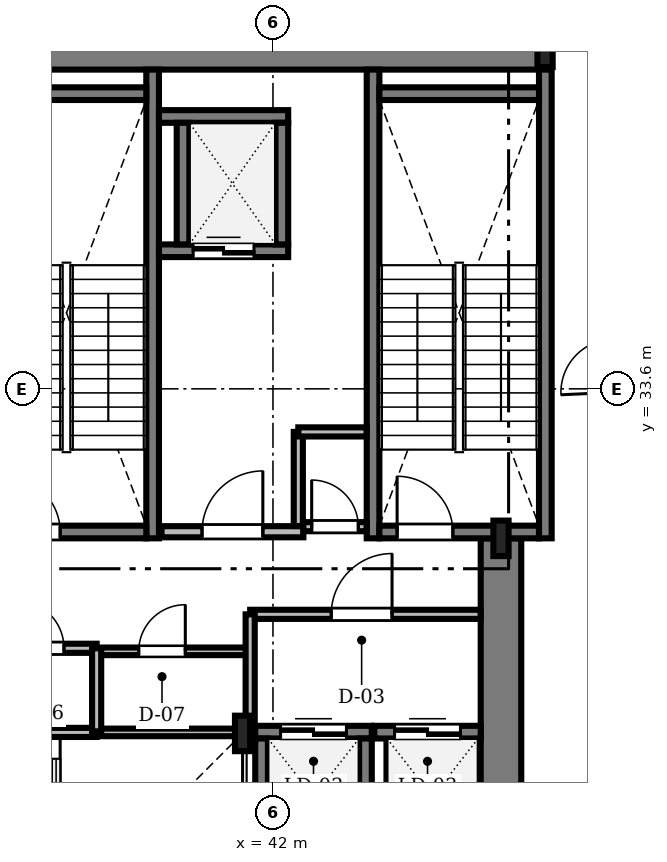
"""IFC4 building model, lengths in metres.
Left out: names, types, materials, properties, quantities, classifications, styles, units other than length and angle.
Written with IfcOpenShell. Run it as: python <this file> out.ifc"""

import sys

from ifc_helpers import new_model, si_unit, direction, frame, frame_2d, origin, origin_2d, place, context, subcontext, project, spatial, rectangle, i_section, extrude, source, transform, mapped, element, fill, save


model = new_model("IFC4")
c1 = context("Model", 3, precision=1e-05, world=origin(), true_north=direction((0.0, 1.0)))
c2 = subcontext(c1, "Body", "Model", "MODEL_VIEW")
j1 = project(units=[si_unit("LENGTHUNIT", "METRE"), si_unit("PLANEANGLEUNIT", "RADIAN")], contexts=[c1])
p1 = place(None, origin())
s1 = spatial("IfcSite", under=j1, at=p1, CompositionType="ELEMENT")
p2 = place(p1, origin())
s2 = spatial("IfcBuilding", under=s1, at=p2, CompositionType="ELEMENT")
p3 = place(p2, frame((0.0, 0.0, 172.2)))
s3 = spatial("IfcBuildingStorey", under=s2, at=p3, CompositionType="ELEMENT", Elevation=172.2)
m1 = source(origin(), c2, "Body", "SweptSolid", [
    extrude(rectangle(XDim=17.52, YDim=0.8, at=frame_2d((8.76, 0.0))), origin(), (0.0, 0.0, 1.0), 4.78),
])
p4 = place(p3, frame((29.85, 40.3, 0.0), z_axis=(0.0, 0.0, 1.0), x_axis=(1.0, 0.0, 0.0)))
e1 = element("IfcWall", 1, at=p4, inside=s3, PredefinedType="SHEAR", context=c2, shape_type="MappedRepresentation", body=[
    mapped(m1, transform((0.0, 0.0, 0.0), scale=1.0)),
])
m2 = source(origin(), c2, "Body", "SweptSolid", [
    extrude(rectangle(XDim=13.15, YDim=0.8, at=frame_2d((6.575, 0.0))), origin(), (0.0, 0.0, 1.0), 4.78),
])
p5 = place(p3, frame((46.5, 17.5, 0.0), z_axis=(0.0, 0.0, 1.0), x_axis=(0.0, 1.0, 0.0)))
e2 = element("IfcWall", 2, at=p5, inside=s3, PredefinedType="SHEAR", context=c2, shape_type="MappedRepresentation", body=[
    mapped(m2, transform((0.0, 0.0, 0.0), scale=1.0)),
])
m3 = source(origin(), c2, "Body", "SweptSolid", [
    extrude(i_section(OverallWidth=0.3, OverallDepth=0.7, WebThickness=0.017, FlangeThickness=0.032, FilletRadius=0.027, at=origin_2d()), origin(), (0.0, 0.0, 1.0), 4.78),
])
for number, where, z_axis, x_axis in (
    (3, (41.4, 26.8, 0.0), (0.0, 0.0, 1.0), (1.0, 0.0, 0.0)),
    (4, (46.5, 30.65, 0.0), (0.0, 0.0, 1.0), (1.0, 0.0, 0.0)),
    (5, (47.37, 40.3, 0.0), (0.0, 0.0, 1.0), (1.0, 0.0, 0.0)),
):
    element("IfcColumn", number, at=place(p3, frame(where, z_axis=z_axis, x_axis=x_axis)), inside=s3, PredefinedType="COLUMN", context=c2, shape_type="MappedRepresentation", body=[
        mapped(m3, transform((0.0, 0.0, 0.0), scale=1.0)),
    ])
m4 = source(origin(), c2, "Body", "SweptSolid", [
    extrude(rectangle(XDim=9.25, YDim=0.25, at=frame_2d((4.625, 0.0))), origin(), (0.0, 0.0, 1.0), 4.8),
])
p6 = place(p3, frame((39.625, 30.65, 0.0), z_axis=(0.0, 0.0, 1.0), x_axis=(0.0, 1.0, 0.0)))
e6 = element("IfcWall", 6, at=p6, inside=s3, PredefinedType="SOLIDWALL", context=c2, shape_type="MappedRepresentation", body=[
    mapped(m4, transform((0.0, 0.0, 0.0), scale=1.0)),
])
m5 = source(origin(), c2, "Body", "SweptSolid", [
    extrude(rectangle(XDim=3.15, YDim=0.25, at=frame_2d((1.575, 0.0))), origin(), (0.0, 0.0, 1.0), 4.8),
])
p7 = place(p3, frame((36.35, 39.425, 0.0), z_axis=(0.0, 0.0, 1.0), x_axis=(1.0, 0.0, 0.0)))
e7 = element("IfcWall", 7, at=p7, inside=s3, PredefinedType="SOLIDWALL", context=c2, shape_type="MappedRepresentation", body=[
    mapped(m5, transform((0.0, 0.0, 0.0), scale=1.0)),
])
p8 = place(p3, frame((36.35, 30.775, 0.0), z_axis=(0.0, 0.0, 1.0), x_axis=(1.0, 0.0, 0.0)))
e8 = element("IfcWall", 8, at=p8, inside=s3, PredefinedType="SOLIDWALL", context=c2, shape_type="MappedRepresentation", body=[
    mapped(m5, transform((0.0, 0.0, 0.0), scale=1.0)),
])
m6 = source(origin(), c2, "Body", "SweptSolid", [
    extrude(rectangle(XDim=1.1, YDim=2.2, at=frame_2d((0.55, 1.1))), frame((0.0, 0.135, 0.0), z_axis=(0.0, -1.0, 0.0), x_axis=(1.0, 0.0, 0.0)), (0.0, 0.0, 1.0), 0.27),
])
p9 = place(p8, frame((0.35, 0.0, 0.0)))
e9 = element("IfcOpeningElement", 9, at=p9, cuts=e8, PredefinedType="OPENING", context=c2, shape_type="MappedRepresentation", body=[
    mapped(m6, transform((0.0, 0.0, 0.0), scale=1.0)),
])
for number, where, z_axis, x_axis in (
    (10, (43.975, 30.65, 0.0), (0.0, 0.0, 1.0), (0.0, 1.0, 0.0)),
    (11, (47.375, 30.65, 0.0), (0.0, 0.0, 1.0), (0.0, 1.0, 0.0)),
):
    element("IfcWall", number, at=place(p3, frame(where, z_axis=z_axis, x_axis=x_axis)), inside=s3, PredefinedType="SOLIDWALL", context=c2, shape_type="MappedRepresentation", body=[
        mapped(m4, transform((0.0, 0.0, 0.0), scale=1.0)),
    ])
p10 = place(p3, frame((44.1, 39.425, 0.0), z_axis=(0.0, 0.0, 1.0), x_axis=(1.0, 0.0, 0.0)))
e12 = element("IfcWall", 12, at=p10, inside=s3, PredefinedType="SOLIDWALL", context=c2, shape_type="MappedRepresentation", body=[
    mapped(m5, transform((0.0, 0.0, 0.0), scale=1.0)),
])
p11 = place(p3, frame((44.1, 30.775, 0.0), z_axis=(0.0, 0.0, 1.0), x_axis=(1.0, 0.0, 0.0)))
e13 = element("IfcWall", 13, at=p11, inside=s3, PredefinedType="SOLIDWALL", context=c2, shape_type="MappedRepresentation", body=[
    mapped(m5, transform((0.0, 0.0, 0.0), scale=1.0)),
])
p12 = place(p11, frame((0.35, 0.0, 0.0)))
e14 = element("IfcOpeningElement", 14, at=p12, cuts=e13, PredefinedType="OPENING", context=c2, shape_type="MappedRepresentation", body=[
    mapped(m6, transform((0.0, 0.0, 0.0), scale=1.0)),
])
m7 = source(origin(), c2, "Body", "SweptSolid", [
    extrude(rectangle(XDim=2.8, YDim=0.22, at=frame_2d((1.4, 0.0))), origin(), (0.0, 0.0, 1.0), 4.78),
])
p13 = place(p3, frame((39.8, 30.78, 0.0), z_axis=(0.0, 0.0, 1.0), x_axis=(1.0, 0.0, 0.0)))
e15 = element("IfcWall", 15, at=p13, inside=s3, PredefinedType="SOLIDWALL", context=c2, shape_type="MappedRepresentation", body=[
    mapped(m7, transform((0.0, 0.0, 0.0), scale=1.0)),
])
m8 = source(origin(), c2, "Body", "SweptSolid", [
    extrude(rectangle(XDim=1.2, YDim=2.2, at=frame_2d((0.6, 1.1))), frame((0.0, 0.12, 0.0), z_axis=(0.0, -1.0, 0.0), x_axis=(1.0, 0.0, 0.0)), (0.0, 0.0, 1.0), 0.24),
])
p14 = place(p13, frame((0.8, 0.0, 0.0)))
e16 = element("IfcOpeningElement", 16, at=p14, cuts=e15, PredefinedType="OPENING", context=c2, shape_type="MappedRepresentation", body=[
    mapped(m8, transform((0.0, 0.0, 0.0), scale=1.0)),
])
m9 = source(origin(), c2, "Body", "SweptSolid", [
    extrude(rectangle(XDim=2.55, YDim=0.25, at=frame_2d((1.275, 0.0))), origin(), (0.0, 0.0, 1.0), 4.78),
])
p15 = place(p3, frame((39.75, 36.325, 0.0), z_axis=(0.0, 0.0, 1.0), x_axis=(1.0, 0.0, 0.0)))
e17 = element("IfcWall", 17, at=p15, inside=s3, PredefinedType="SOLIDWALL", context=c2, shape_type="MappedRepresentation", body=[
    mapped(m9, transform((0.0, 0.0, 0.0), scale=1.0)),
])
m10 = source(origin(), c2, "Body", "SweptSolid", [
    extrude(rectangle(XDim=1.2, YDim=2.25, at=frame_2d((0.6, 1.125))), frame((0.0, 0.135, 0.0), z_axis=(0.0, -1.0, 0.0), x_axis=(1.0, 0.0, 0.0)), (0.0, 0.0, 1.0), 0.27),
])
p16 = place(p15, frame((0.675, 0.0, 0.0)))
e18 = element("IfcOpeningElement", 18, at=p16, cuts=e17, PredefinedType="OPENING", context=c2, shape_type="MappedRepresentation", body=[
    mapped(m10, transform((0.0, 0.0, 0.0), scale=1.0)),
])
p17 = place(p3, frame((39.75, 38.975, 0.0), z_axis=(0.0, 0.0, 1.0), x_axis=(1.0, 0.0, 0.0)))
e19 = element("IfcWall", 19, at=p17, inside=s3, PredefinedType="SOLIDWALL", context=c2, shape_type="MappedRepresentation", body=[
    mapped(m9, transform((0.0, 0.0, 0.0), scale=1.0)),
])
m11 = source(origin(), c2, "Body", "SweptSolid", [
    extrude(rectangle(XDim=2.4, YDim=0.25, at=frame_2d((1.2, 0.0))), origin(), (0.0, 0.0, 1.0), 4.78),
])
for number, where, z_axis, x_axis in (
    (20, (40.225, 36.45, 0.0), (0.0, 0.0, 1.0), (0.0, 1.0, 0.0)),
    (21, (42.175, 36.45, 0.0), (0.0, 0.0, 1.0), (0.0, 1.0, 0.0)),
):
    element("IfcWall", number, at=place(p3, frame(where, z_axis=z_axis, x_axis=x_axis)), inside=s3, PredefinedType="SOLIDWALL", context=c2, shape_type="MappedRepresentation", body=[
        mapped(m11, transform((0.0, 0.0, 0.0), scale=1.0)),
    ])
m12 = source(origin(), c2, "Body", "SweptSolid", [
    extrude(rectangle(XDim=2.3, YDim=0.25, at=frame_2d((1.15, 0.0))), origin(), (0.0, 0.0, 1.0), 4.78),
])
p18 = place(p3, frame((41.65, 26.825, 0.0), z_axis=(0.0, 0.0, 1.0), x_axis=(1.0, 0.0, 0.0)))
e22 = element("IfcWall", 22, at=p18, inside=s3, PredefinedType="SOLIDWALL", context=c2, shape_type="MappedRepresentation", body=[
    mapped(m12, transform((0.0, 0.0, 0.0), scale=1.0)),
])
m13 = source(origin(), c2, "Body", "SweptSolid", [
    extrude(rectangle(XDim=1.3, YDim=2.3, at=frame_2d((0.65, 1.15))), frame((0.0, 0.135, 0.0), z_axis=(0.0, -1.0, 0.0), x_axis=(1.0, 0.0, 0.0)), (0.0, 0.0, 1.0), 0.27),
])
p19 = place(p18, frame((0.5, 0.0, 0.0)))
e23 = element("IfcOpeningElement", 23, at=p19, cuts=e22, PredefinedType="OPENING", context=c2, shape_type="MappedRepresentation", body=[
    mapped(m13, transform((0.0, 0.0, 0.0), scale=1.0)),
])
for number, where, z_axis, x_axis in (
    (24, (41.775, 24.4, 0.0), (0.0, 0.0, 1.0), (0.0, 1.0, 0.0)),
    (25, (43.825, 24.4, 0.0), (0.0, 0.0, 1.0), (0.0, 1.0, 0.0)),
):
    element("IfcWall", number, at=place(p3, frame(where, z_axis=z_axis, x_axis=x_axis)), inside=s3, PredefinedType="SOLIDWALL", context=c2, shape_type="MappedRepresentation", body=[
        mapped(m12, transform((0.0, 0.0, 0.0), scale=1.0)),
    ])
m14 = source(origin(), c2, "Body", "SweptSolid", [
    extrude(rectangle(XDim=2.1, YDim=0.25, at=frame_2d((1.05, 0.0))), origin(), (0.0, 0.0, 1.0), 4.78),
])
p20 = place(p3, frame((44.0, 26.825, 0.0), z_axis=(0.0, 0.0, 1.0), x_axis=(1.0, 0.0, 0.0)))
e26 = element("IfcWall", 26, at=p20, inside=s3, PredefinedType="SOLIDWALL", context=c2, shape_type="MappedRepresentation", body=[
    mapped(m14, transform((0.0, 0.0, 0.0), scale=1.0)),
])
p21 = place(p20, frame((0.4, 0.0, 0.0)))
e27 = element("IfcOpeningElement", 27, at=p21, cuts=e26, PredefinedType="OPENING", context=c2, shape_type="MappedRepresentation", body=[
    mapped(m13, transform((0.0, 0.0, 0.0), scale=1.0)),
])
m15 = source(origin(), c2, "Body", "SweptSolid", [
    extrude(rectangle(XDim=4.548, YDim=0.18, at=frame_2d((2.274, 0.0))), origin(), (0.0, 0.0, 1.0), 4.412),
])
p22 = place(p3, frame((41.55, 29.15, 0.0), z_axis=(0.0, 0.0, 1.0), x_axis=(1.0, 0.0, 0.0)))
e28 = element("IfcWall", 28, at=p22, inside=s3, PredefinedType="PARTITIONING", context=c2, shape_type="MappedRepresentation", body=[
    mapped(m15, transform((0.0, 0.0, 0.0), scale=1.0)),
])
m16 = source(origin(), c2, "Body", "SweptSolid", [
    extrude(rectangle(XDim=1.2, YDim=2.2, at=frame_2d((0.6, 1.1))), frame((0.0, 0.1, 0.0), z_axis=(0.0, -1.0, 0.0), x_axis=(1.0, 0.0, 0.0)), (0.0, 0.0, 1.0), 0.2),
])
p23 = place(p22, frame((1.6, 0.0, 0.0)))
e29 = element("IfcOpeningElement", 29, at=p23, cuts=e28, PredefinedType="OPENING", context=c2, shape_type="MappedRepresentation", body=[
    mapped(m16, transform((0.0, 0.0, 0.0), scale=1.0)),
])
m17 = source(origin(), c2, "Body", "SweptSolid", [
    extrude(rectangle(XDim=3.37, YDim=0.18, at=frame_2d((1.685, 0.0))), origin(), (0.0, 0.0, 1.0), 4.78),
])
p24 = place(p3, frame((35.15, 28.48, 0.0), z_axis=(0.0, 0.0, 1.0), x_axis=(1.0, 0.0, 0.0)))
e30 = element("IfcWall", 30, at=p24, inside=s3, PredefinedType="PARTITIONING", context=c2, shape_type="MappedRepresentation", body=[
    mapped(m17, transform((0.0, 0.0, 0.0), scale=1.0)),
])
m18 = source(origin(), c2, "Body", "SweptSolid", [
    extrude(rectangle(XDim=0.95, YDim=2.15, at=frame_2d((0.475, 1.075))), frame((0.0, 0.1, 0.0), z_axis=(0.0, -1.0, 0.0), x_axis=(1.0, 0.0, 0.0)), (0.0, 0.0, 1.0), 0.2),
])
p25 = place(p24, frame((1.775, 0.0, 0.0)))
e31 = element("IfcOpeningElement", 31, at=p25, cuts=e30, PredefinedType="OPENING", context=c2, shape_type="MappedRepresentation", body=[
    mapped(m18, transform((0.0, 0.0, 0.0), scale=1.0)),
])
m19 = source(origin(), c2, "Body", "SweptSolid", [
    extrude(rectangle(XDim=3.0, YDim=0.15, at=frame_2d((1.5, 0.0))), origin(), (0.0, 0.0, 1.0), 4.78),
])
p26 = place(p3, frame((38.52, 28.42, 0.0), z_axis=(0.0, 0.0, 1.0), x_axis=(1.0, 0.0, 0.0)))
e32 = element("IfcWall", 32, at=p26, inside=s3, PredefinedType="PARTITIONING", context=c2, shape_type="MappedRepresentation", body=[
    mapped(m19, transform((0.0, 0.0, 0.0), scale=1.0)),
])
m20 = source(origin(), c2, "Body", "SweptSolid", [
    extrude(rectangle(XDim=0.92, YDim=2.1, at=frame_2d((0.46, 1.05))), frame((0.0, 0.085, 0.0), z_axis=(0.0, -1.0, 0.0), x_axis=(1.0, 0.0, 0.0)), (0.0, 0.0, 1.0), 0.17),
])
p27 = place(p26, frame((0.83, 0.0, 0.0)))
e33 = element("IfcOpeningElement", 33, at=p27, cuts=e32, PredefinedType="OPENING", context=c2, shape_type="MappedRepresentation", body=[
    mapped(m20, transform((0.0, 0.0, 0.0), scale=1.0)),
])
m21 = source(origin(), c2, "Body", "SweptSolid", [
    extrude(rectangle(XDim=1.248, YDim=0.18, at=frame_2d((0.624, 0.0))), origin(), (0.0, 0.0, 1.0), 4.78),
])
p28 = place(p3, frame((42.6, 30.88, 0.0), z_axis=(0.0, 0.0, 1.0), x_axis=(1.0, 0.0, 0.0)))
e34 = element("IfcWall", 34, at=p28, inside=s3, PredefinedType="PARTITIONING", context=c2, shape_type="MappedRepresentation", body=[
    mapped(m21, transform((0.0, 0.0, 0.0), scale=1.0)),
])
m22 = source(origin(), c2, "Body", "SweptSolid", [
    extrude(rectangle(XDim=0.92, YDim=2.1, at=frame_2d((0.46, 1.05))), frame((0.0, 0.1, 0.0), z_axis=(0.0, -1.0, 0.0), x_axis=(1.0, 0.0, 0.0)), (0.0, 0.0, 1.0), 0.2),
])
p29 = place(p28, frame((0.164, 0.0, 0.0)))
e35 = element("IfcOpeningElement", 35, at=p29, cuts=e34, PredefinedType="OPENING", context=c2, shape_type="MappedRepresentation", body=[
    mapped(m22, transform((0.0, 0.0, 0.0), scale=1.0)),
])
m23 = source(origin(), c2, "Body", "SweptSolid", [
    extrude(rectangle(XDim=3.37, YDim=0.18, at=frame_2d((1.685, 0.0))), origin(), (0.0, 0.0, 1.0), 4.322),
])
p30 = place(p3, frame((35.15, 26.82, 0.0), z_axis=(0.0, 0.0, 1.0), x_axis=(1.0, 0.0, 0.0)))
e36 = element("IfcWall", 36, at=p30, inside=s3, PredefinedType="PARTITIONING", context=c2, shape_type="MappedRepresentation", body=[
    mapped(m23, transform((0.0, 0.0, 0.0), scale=1.0)),
])
m24 = source(origin(), c2, "Body", "SweptSolid", [
    extrude(rectangle(XDim=3.0, YDim=0.15, at=frame_2d((1.5, 0.0))), origin(), (0.0, 0.0, 1.0), 4.222),
])
p31 = place(p3, frame((38.52, 26.82, 0.0), z_axis=(0.0, 0.0, 1.0), x_axis=(1.0, 0.0, 0.0)))
e37 = element("IfcWall", 37, at=p31, inside=s3, PredefinedType="PARTITIONING", context=c2, shape_type="MappedRepresentation", body=[
    mapped(m24, transform((0.0, 0.0, 0.0), scale=1.0)),
])
m25 = source(origin(), c2, "Body", "SweptSolid", [
    extrude(rectangle(XDim=2.35, YDim=0.18, at=frame_2d((1.175, 0.0))), origin(), (0.0, 0.0, 1.0), 4.222),
])
p32 = place(p3, frame((41.55, 26.8, 0.0), z_axis=(0.0, 0.0, 1.0), x_axis=(0.0, 1.0, 0.0)))
e38 = element("IfcWall", 38, at=p32, inside=s3, PredefinedType="PARTITIONING", context=c2, shape_type="MappedRepresentation", body=[
    mapped(m25, transform((0.0, 0.0, 0.0), scale=1.0)),
])
m26 = source(origin(), c2, "Body", "SweptSolid", [
    extrude(rectangle(XDim=1.858, YDim=0.18, at=frame_2d((0.929, 0.0))), origin(), (0.0, 0.0, 1.0), 4.78),
])
p33 = place(p3, frame((42.5, 30.892, 0.0), z_axis=(0.0, 0.0, 1.0), x_axis=(0.0, 1.0, 0.0)))
e39 = element("IfcWall", 39, at=p33, inside=s3, PredefinedType="PARTITIONING", context=c2, shape_type="MappedRepresentation", body=[
    mapped(m26, transform((0.0, 0.0, 0.0), scale=1.0)),
])
m27 = source(origin(), c2, "Body", "SweptSolid", [
    extrude(rectangle(XDim=1.66, YDim=0.18, at=frame_2d((0.83, 0.0))), origin(), (0.0, 0.0, 1.0), 4.322),
])
p34 = place(p3, frame((38.52, 26.82, 0.0), z_axis=(0.0, 0.0, 1.0), x_axis=(0.0, 1.0, 0.0)))
e40 = element("IfcWall", 40, at=p34, inside=s3, PredefinedType="PARTITIONING", context=c2, shape_type="MappedRepresentation", body=[
    mapped(m27, transform((0.0, 0.0, 0.0), scale=1.0)),
])
m28 = source(origin(), c2, "Body", "SweptSolid", [
    extrude(rectangle(XDim=1.348, YDim=0.18, at=frame_2d((0.674, 0.0))), origin(), (0.0, 0.0, 1.0), 4.78),
])
p35 = place(p3, frame((42.5, 32.75, 0.0), z_axis=(0.0, 0.0, 1.0), x_axis=(1.0, 0.0, 0.0)))
e41 = element("IfcWall", 41, at=p35, inside=s3, PredefinedType="PARTITIONING", context=c2, shape_type="MappedRepresentation", body=[
    mapped(m28, transform((0.0, 0.0, 0.0), scale=1.0)),
])
m29 = source(origin(), c2, "Body", "SweptSolid", [
    extrude(rectangle(XDim=1.1, YDim=2.2, at=frame_2d((0.55, 1.1))), frame((0.0, 0.025, 0.0), z_axis=(0.0, -1.0, 0.0), x_axis=(1.0, 0.0, 0.0)), (0.0, 0.0, 1.0), 0.05),
])
p36 = place(p9, origin())
e42 = element("IfcDoor", 42, at=p36, inside=s3, OperationType="SINGLE_SWING_LEFT", PredefinedType="DOOR", context=c2, shape_type="MappedRepresentation", body=[
    mapped(m29, transform((0.0, 0.0, 0.0), scale=1.0)),
])
fill(e9, e42)
p37 = place(p12, origin())
e43 = element("IfcDoor", 43, at=p37, inside=s3, OperationType="SINGLE_SWING_LEFT", PredefinedType="DOOR", context=c2, shape_type="MappedRepresentation", body=[
    mapped(m29, transform((0.0, 0.0, 0.0), scale=1.0)),
])
fill(e14, e43)
m30 = source(origin(), c2, "Body", "SweptSolid", [
    extrude(rectangle(XDim=1.2, YDim=2.2, at=frame_2d((0.6, 1.1))), frame((0.0, 0.025, 0.0), z_axis=(0.0, -1.0, 0.0), x_axis=(1.0, 0.0, 0.0)), (0.0, 0.0, 1.0), 0.05),
])
p38 = place(p14, origin())
e44 = element("IfcDoor", 44, at=p38, inside=s3, OperationType="SINGLE_SWING_RIGHT", PredefinedType="DOOR", context=c2, shape_type="MappedRepresentation", body=[
    mapped(m30, transform((0.0, 0.0, 0.0), scale=1.0)),
])
fill(e16, e44)
m31 = source(origin(), c2, "Body", "SweptSolid", [
    extrude(rectangle(XDim=1.2, YDim=2.25, at=frame_2d((0.6, 1.125))), frame((0.0, 0.025, 0.0), z_axis=(0.0, -1.0, 0.0), x_axis=(1.0, 0.0, 0.0)), (0.0, 0.0, 1.0), 0.05),
])
p39 = place(p16, origin())
e45 = element("IfcDoor", 45, at=p39, inside=s3, OperationType="DOUBLE_DOOR_SLIDING", PredefinedType="DOOR", context=c2, shape_type="MappedRepresentation", body=[
    mapped(m31, transform((0.0, 0.0, 0.0), scale=1.0)),
])
fill(e18, e45)
m32 = source(origin(), c2, "Body", "SweptSolid", [
    extrude(rectangle(XDim=1.3, YDim=2.3, at=frame_2d((0.65, 1.15))), frame((0.0, 0.025, 0.0), z_axis=(0.0, -1.0, 0.0), x_axis=(1.0, 0.0, 0.0)), (0.0, 0.0, 1.0), 0.05),
])
p40 = place(p19, origin())
e46 = element("IfcDoor", 46, at=p40, inside=s3, OperationType="DOUBLE_DOOR_SLIDING", PredefinedType="DOOR", context=c2, shape_type="MappedRepresentation", body=[
    mapped(m32, transform((0.0, 0.0, 0.0), scale=1.0)),
])
fill(e23, e46)
p41 = place(p21, origin())
e47 = element("IfcDoor", 47, at=p41, inside=s3, OperationType="DOUBLE_DOOR_SLIDING", PredefinedType="DOOR", context=c2, shape_type="MappedRepresentation", body=[
    mapped(m32, transform((0.0, 0.0, 0.0), scale=1.0)),
])
fill(e27, e47)
p42 = place(p23, origin())
e48 = element("IfcDoor", 48, at=p42, inside=s3, OperationType="SINGLE_SWING_RIGHT", PredefinedType="DOOR", context=c2, shape_type="MappedRepresentation", body=[
    mapped(m30, transform((0.0, 0.0, 0.0), scale=1.0)),
])
fill(e29, e48)
m33 = source(origin(), c2, "Body", "SweptSolid", [
    extrude(rectangle(XDim=0.95, YDim=2.15, at=frame_2d((0.475, 1.075))), frame((0.0, 0.025, 0.0), z_axis=(0.0, -1.0, 0.0), x_axis=(1.0, 0.0, 0.0)), (0.0, 0.0, 1.0), 0.05),
])
p43 = place(p25, origin())
e49 = element("IfcDoor", 49, at=p43, inside=s3, OperationType="SINGLE_SWING_LEFT", PredefinedType="DOOR", context=c2, shape_type="MappedRepresentation", body=[
    mapped(m33, transform((0.0, 0.0, 0.0), scale=1.0)),
])
fill(e31, e49)
m34 = source(origin(), c2, "Body", "SweptSolid", [
    extrude(rectangle(XDim=0.92, YDim=2.1, at=frame_2d((0.46, 1.05))), frame((0.0, 0.025, 0.0), z_axis=(0.0, -1.0, 0.0), x_axis=(1.0, 0.0, 0.0)), (0.0, 0.0, 1.0), 0.05),
])
p44 = place(p27, origin())
e50 = element("IfcDoor", 50, at=p44, inside=s3, OperationType="SINGLE_SWING_RIGHT", PredefinedType="DOOR", context=c2, shape_type="MappedRepresentation", body=[
    mapped(m34, transform((0.0, 0.0, 0.0), scale=1.0)),
])
fill(e33, e50)
p45 = place(p29, origin())
e51 = element("IfcDoor", 51, at=p45, inside=s3, OperationType="SINGLE_SWING_LEFT", PredefinedType="DOOR", context=c2, shape_type="MappedRepresentation", body=[
    mapped(m34, transform((0.0, 0.0, 0.0), scale=1.0)),
])
fill(e35, e51)
save(model, sys.argv[1])
